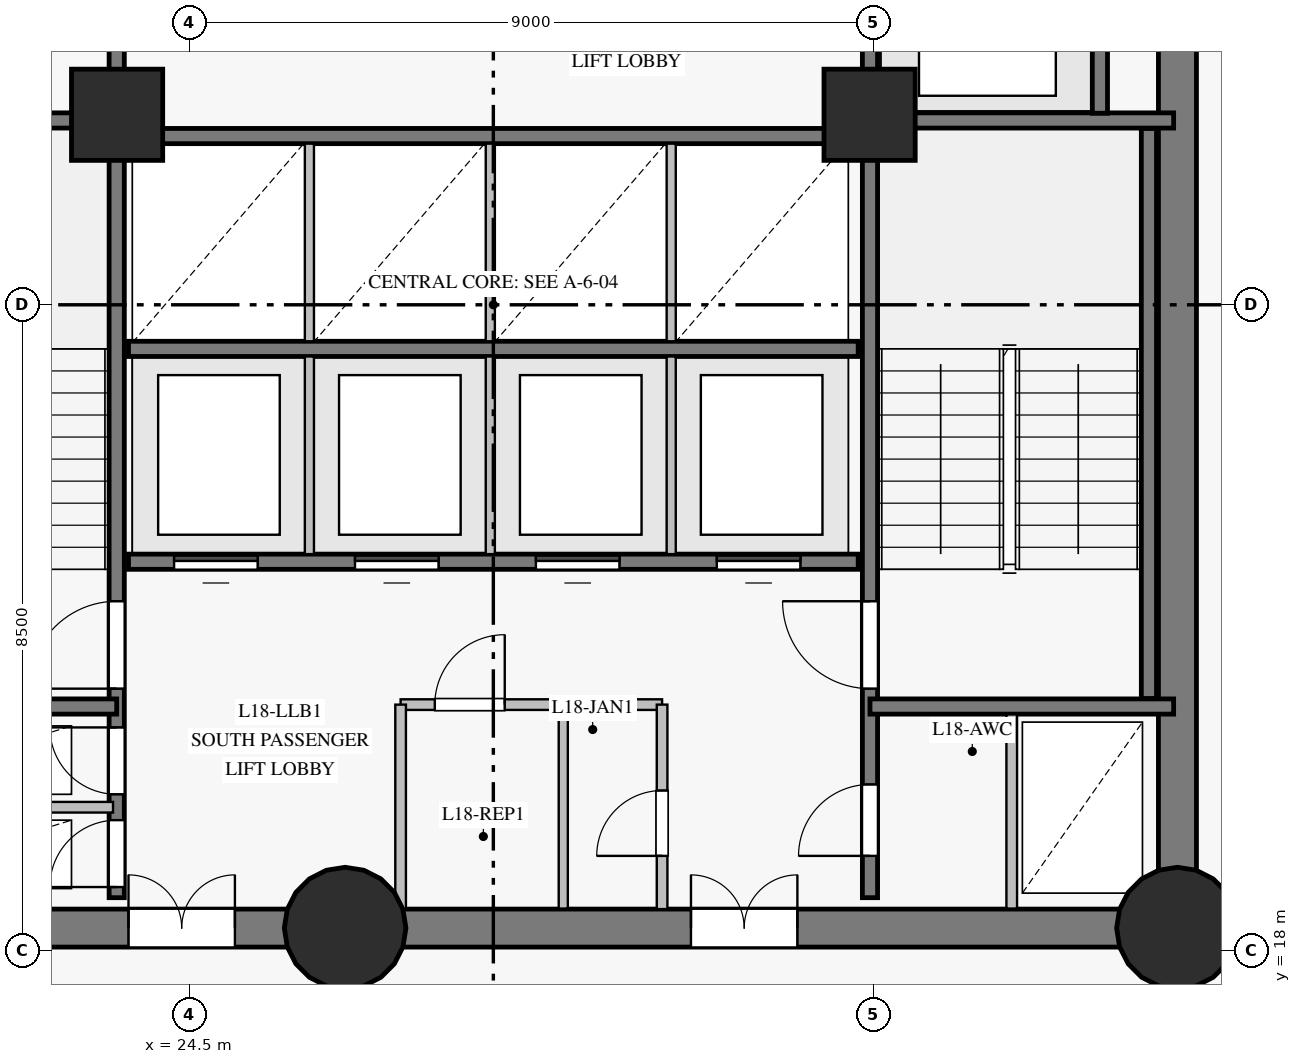
"""IFC4 building model, lengths in metres.
Left out: names, types, materials, properties, quantities, classifications, styles, units other than length and angle.
Written with IfcOpenShell. Run it as: python <this file> out.ifc"""

import sys

from ifc_helpers import new_model, si_unit, direction, frame, frame_2d, origin, origin_with_axes, origin_2d, place, context, subcontext, project, spatial, rectangle, circle, extrude, source, transform, mapped, element, fill, save


model = new_model("IFC4")
c1 = context("Model", 3, precision=1e-05, world=origin(), true_north=direction((0.0, 1.0)))
c2 = subcontext(c1, "Body", "Model", "MODEL_VIEW")
j1 = project(units=[si_unit("LENGTHUNIT", "METRE"), si_unit("PLANEANGLEUNIT", "RADIAN")], contexts=[c1])
p1 = place(None, origin())
s1 = spatial("IfcSite", under=j1, at=p1, CompositionType="ELEMENT")
p2 = place(p1, origin())
s2 = spatial("IfcBuilding", under=s1, at=p2, CompositionType="ELEMENT")
p3 = place(p2, frame((0.0, 0.0, 69.7)))
s3 = spatial("IfcBuildingStorey", under=s2, at=p3, CompositionType="ELEMENT", Elevation=69.7)
p4 = place(p3, frame((19.5, 18.3, 0.0), z_axis=(0.0, 0.0, 1.0), x_axis=(1.0, 0.0, 0.0)))
e1 = element("IfcWall", 1, at=p4, inside=s3, PredefinedType="SHEAR", context=c2, shape_type="SweptSolid", body=[
    extrude(rectangle(XDim=7.05, YDim=0.5, at=frame_2d((3.525, 0.0))), origin(), (0.0, 0.0, 1.0), 3.35),
])
p5 = place(p4, frame((4.2, 0.0, 0.0)))
e2 = element("IfcOpeningElement", 2, at=p5, cuts=e1, PredefinedType="OPENING", context=c2, shape_type="SweptSolid", body=[
    extrude(rectangle(XDim=1.4, YDim=2.2, at=frame_2d((0.7, 1.1))), frame((0.0, 0.26, 0.0), z_axis=(0.0, -1.0, 0.0), x_axis=(1.0, 0.0, 0.0)), (0.0, 0.0, 1.0), 0.52),
])
p6 = place(p3, frame((26.55, 18.3, 0.0), z_axis=(0.0, 0.0, 1.0), x_axis=(1.0, 0.0, 0.0)))
e3 = element("IfcWall", 3, at=p6, inside=s3, PredefinedType="SHEAR", context=c2, shape_type="SweptSolid", body=[
    extrude(rectangle(XDim=10.95, YDim=0.5, at=frame_2d((5.475, 0.0))), origin(), (0.0, 0.0, 1.0), 3.35),
])
p7 = place(p6, frame((4.55, 0.0, 0.0)))
e4 = element("IfcOpeningElement", 4, at=p7, cuts=e3, PredefinedType="OPENING", context=c2, shape_type="SweptSolid", body=[
    extrude(rectangle(XDim=1.4, YDim=2.2, at=frame_2d((0.7, 1.1))), frame((0.0, 0.26, 0.0), z_axis=(0.0, -1.0, 0.0), x_axis=(1.0, 0.0, 0.0)), (0.0, 0.0, 1.0), 0.52),
])
p8 = place(p3, frame((37.5, 18.3, 0.0), z_axis=(0.0, 0.0, 1.0), x_axis=(0.0, 1.0, 0.0)))
e5 = element("IfcWall", 5, at=p8, inside=s3, PredefinedType="SHEAR", context=c2, shape_type="SweptSolid", body=[
    extrude(rectangle(XDim=16.4, YDim=0.5, at=frame_2d((8.2, 0.0))), origin(), (0.0, 0.0, 1.0), 3.35),
])
p9 = place(p8, frame((14.06, 0.0, 0.0)))
e6 = element("IfcOpeningElement", 6, at=p9, cuts=e5, PredefinedType="OPENING", context=c2, shape_type="SweptSolid", body=[
    extrude(rectangle(XDim=1.2, YDim=2.15, at=frame_2d((0.6, 1.075))), frame((0.0, 0.26, 0.0), z_axis=(0.0, -1.0, 0.0), x_axis=(1.0, 0.0, 0.0)), (0.0, 0.0, 1.0), 0.52),
])
m1 = source(origin_with_axes(), c2, "Body", "SweptSolid", [
    extrude(circle(Radius=0.8, at=origin_2d()), origin(), (0.0, 0.0, 1.0), 3.6),
])
for number, where, z_axis, x_axis in (
    (7, (26.55, 18.3, 0.0), (0.0, 0.0, 1.0), (1.0, 0.0, 0.0)),
    (8, (37.5, 18.3, 0.0), (0.0, 0.0, 1.0), (1.0, 0.0, 0.0)),
):
    element("IfcColumn", number, at=place(p3, frame(where, z_axis=z_axis, x_axis=x_axis)), inside=s3, PredefinedType="COLUMN", context=c2, shape_type="MappedRepresentation", body=[
        mapped(m1, transform((0.0, 0.0, 0.0), scale=1.0)),
    ])
m2 = source(origin_with_axes(), c2, "Body", "SweptSolid", [
    extrude(rectangle(XDim=1.2, YDim=1.2, at=origin_2d()), origin(), (0.0, 0.0, 1.0), 3.6),
])
for number, where, z_axis, x_axis in (
    (9, (23.55, 29.0, 0.0), (0.0, 0.0, 1.0), (1.0, 0.0, 0.0)),
    (10, (33.45, 29.0, 0.0), (0.0, 0.0, 1.0), (1.0, 0.0, 0.0)),
):
    element("IfcColumn", number, at=place(p3, frame(where, z_axis=z_axis, x_axis=x_axis)), inside=s3, PredefinedType="COLUMN", context=c2, shape_type="MappedRepresentation", body=[
        mapped(m2, transform((0.0, 0.0, 0.0), scale=1.0)),
    ])
p10 = place(p3, frame((23.545, 18.7, 0.0), z_axis=(0.0, 0.0, 1.0), x_axis=(0.0, 1.0, 0.0)))
e11 = element("IfcWall", 11, at=p10, inside=s3, PredefinedType="SHEAR", context=c2, shape_type="SweptSolid", body=[
    extrude(rectangle(XDim=15.6, YDim=0.2, at=frame_2d((7.8, 0.0))), origin(), (0.0, 0.0, 1.0), 3.35),
])
p11 = place(p10, frame((2.75, 0.0, 0.0)))
e12 = element("IfcOpeningElement", 12, at=p11, cuts=e11, PredefinedType="OPENING", context=c2, shape_type="SweptSolid", body=[
    extrude(rectangle(XDim=1.15, YDim=2.15, at=frame_2d((0.575, 1.075))), frame((0.0, 0.11, 0.0), z_axis=(0.0, -1.0, 0.0), x_axis=(1.0, 0.0, 0.0)), (0.0, 0.0, 1.0), 0.22),
])
p12 = place(p10, frame((0.14, 0.0, 0.0)))
e13 = element("IfcOpeningElement", 13, at=p12, cuts=e11, PredefinedType="OPENING", context=c2, shape_type="SweptSolid", body=[
    extrude(rectangle(XDim=0.88, YDim=2.1, at=frame_2d((0.44, 1.05))), frame((0.0, 0.11, 0.0), z_axis=(0.0, -1.0, 0.0), x_axis=(1.0, 0.0, 0.0)), (0.0, 0.0, 1.0), 0.22),
])
p13 = place(p10, frame((1.36, 0.0, 0.0)))
e14 = element("IfcOpeningElement", 14, at=p13, cuts=e11, PredefinedType="OPENING", context=c2, shape_type="SweptSolid", body=[
    extrude(rectangle(XDim=0.88, YDim=2.1, at=frame_2d((0.44, 1.05))), frame((0.0, 0.11, 0.0), z_axis=(0.0, -1.0, 0.0), x_axis=(1.0, 0.0, 0.0)), (0.0, 0.0, 1.0), 0.22),
])
p14 = place(p10, frame((12.1, 0.0, 0.0)))
e15 = element("IfcOpeningElement", 15, at=p14, cuts=e11, PredefinedType="OPENING", context=c2, shape_type="SweptSolid", body=[
    extrude(rectangle(XDim=1.12, YDim=2.15, at=frame_2d((0.56, 1.075))), frame((0.0, 0.11, 0.0), z_axis=(0.0, -1.0, 0.0), x_axis=(1.0, 0.0, 0.0)), (0.0, 0.0, 1.0), 0.22),
])
p15 = place(p10, frame((14.05, 0.0, 0.0)))
e16 = element("IfcOpeningElement", 16, at=p15, cuts=e11, PredefinedType="OPENING", context=c2, shape_type="SweptSolid", body=[
    extrude(rectangle(XDim=1.12, YDim=2.15, at=frame_2d((0.56, 1.075))), frame((0.0, 0.11, 0.0), z_axis=(0.0, -1.0, 0.0), x_axis=(1.0, 0.0, 0.0)), (0.0, 0.0, 1.0), 0.22),
])
p16 = place(p3, frame((33.455, 18.7, 0.0), z_axis=(0.0, 0.0, 1.0), x_axis=(0.0, 1.0, 0.0)))
e17 = element("IfcWall", 17, at=p16, inside=s3, PredefinedType="SHEAR", context=c2, shape_type="SweptSolid", body=[
    extrude(rectangle(XDim=15.6, YDim=0.2, at=frame_2d((7.8, 0.0))), origin(), (0.0, 0.0, 1.0), 3.35),
])
p17 = place(p16, frame((2.75, 0.0, 0.0)))
e18 = element("IfcOpeningElement", 18, at=p17, cuts=e17, PredefinedType="OPENING", context=c2, shape_type="SweptSolid", body=[
    extrude(rectangle(XDim=1.15, YDim=2.15, at=frame_2d((0.575, 1.075))), frame((0.0, 0.11, 0.0), z_axis=(0.0, -1.0, 0.0), x_axis=(1.0, 0.0, 0.0)), (0.0, 0.0, 1.0), 0.22),
])
p18 = place(p16, frame((0.55, 0.0, 0.0)))
e19 = element("IfcOpeningElement", 19, at=p18, cuts=e17, PredefinedType="OPENING", context=c2, shape_type="SweptSolid", body=[
    extrude(rectangle(XDim=0.94, YDim=2.1, at=frame_2d((0.47, 1.05))), frame((0.0, 0.11, 0.0), z_axis=(0.0, -1.0, 0.0), x_axis=(1.0, 0.0, 0.0)), (0.0, 0.0, 1.0), 0.22),
])
p19 = place(p3, frame((23.7, 23.12, 0.0), z_axis=(0.0, 0.0, 1.0), x_axis=(1.0, 0.0, 0.0)))
e20 = element("IfcWall", 20, at=p19, inside=s3, PredefinedType="SHEAR", context=c2, shape_type="SweptSolid", body=[
    extrude(rectangle(XDim=9.6, YDim=0.2, at=frame_2d((4.8, 0.0))), origin(), (0.0, 0.0, 1.0), 3.35),
])
p20 = place(p19, frame((0.6, 0.0, 0.0)))
e21 = element("IfcOpeningElement", 21, at=p20, cuts=e20, PredefinedType="OPENING", context=c2, shape_type="SweptSolid", body=[
    extrude(rectangle(XDim=1.1, YDim=2.15, at=frame_2d((0.55, 1.075))), frame((0.0, 0.11, 0.0), z_axis=(0.0, -1.0, 0.0), x_axis=(1.0, 0.0, 0.0)), (0.0, 0.0, 1.0), 0.22),
])
p21 = place(p19, frame((2.98, 0.0, 0.0)))
e22 = element("IfcOpeningElement", 22, at=p21, cuts=e20, PredefinedType="OPENING", context=c2, shape_type="SweptSolid", body=[
    extrude(rectangle(XDim=1.1, YDim=2.15, at=frame_2d((0.55, 1.075))), frame((0.0, 0.11, 0.0), z_axis=(0.0, -1.0, 0.0), x_axis=(1.0, 0.0, 0.0)), (0.0, 0.0, 1.0), 0.22),
])
p22 = place(p19, frame((5.36, 0.0, 0.0)))
e23 = element("IfcOpeningElement", 23, at=p22, cuts=e20, PredefinedType="OPENING", context=c2, shape_type="SweptSolid", body=[
    extrude(rectangle(XDim=1.1, YDim=2.15, at=frame_2d((0.55, 1.075))), frame((0.0, 0.11, 0.0), z_axis=(0.0, -1.0, 0.0), x_axis=(1.0, 0.0, 0.0)), (0.0, 0.0, 1.0), 0.22),
])
p23 = place(p19, frame((7.74, 0.0, 0.0)))
e24 = element("IfcOpeningElement", 24, at=p23, cuts=e20, PredefinedType="OPENING", context=c2, shape_type="SweptSolid", body=[
    extrude(rectangle(XDim=1.1, YDim=2.15, at=frame_2d((0.55, 1.075))), frame((0.0, 0.11, 0.0), z_axis=(0.0, -1.0, 0.0), x_axis=(1.0, 0.0, 0.0)), (0.0, 0.0, 1.0), 0.22),
])
for number, where, z_axis, x_axis in (
    (25, (23.7, 25.92, 0.0), (0.0, 0.0, 1.0), (1.0, 0.0, 0.0)),
    (26, (23.7, 28.72, 0.0), (0.0, 0.0, 1.0), (1.0, 0.0, 0.0)),
):
    element("IfcWall", number, at=place(p3, frame(where, z_axis=z_axis, x_axis=x_axis)), inside=s3, PredefinedType="SHEAR", context=c2, shape_type="SweptSolid", body=[
        extrude(rectangle(XDim=9.6, YDim=0.2, at=frame_2d((4.8, 0.0))), origin(), (0.0, 0.0, 1.0), 3.35),
    ])
p24 = place(p3, frame((37.125, 21.32, 0.0), z_axis=(0.0, 0.0, 1.0), x_axis=(0.0, 1.0, 0.0)))
e27 = element("IfcWall", 27, at=p24, inside=s3, PredefinedType="SHEAR", context=c2, shape_type="SweptSolid", body=[
    extrude(rectangle(XDim=7.5, YDim=0.2, at=frame_2d((3.75, 0.0))), origin(), (0.0, 0.0, 1.0), 3.35),
])
for number, where, z_axis, x_axis in (
    (28, (33.455, 21.215, 0.0), (0.0, 0.0, 1.0), (1.0, 0.0, 0.0)),
    (29, (33.455, 28.925, 0.0), (0.0, 0.0, 1.0), (1.0, 0.0, 0.0)),
    (30, (19.55, 21.215, 0.0), (0.0, 0.0, 1.0), (1.0, 0.0, 0.0)),
    (31, (19.55, 28.925, 0.0), (0.0, 0.0, 1.0), (1.0, 0.0, 0.0)),
):
    element("IfcWall", number, at=place(p3, frame(where, z_axis=z_axis, x_axis=x_axis)), inside=s3, PredefinedType="SHEAR", context=c2, shape_type="SweptSolid", body=[
        extrude(rectangle(XDim=3.995, YDim=0.2, at=frame_2d((1.998, 0.0))), origin(), (0.0, 0.0, 1.0), 3.35),
    ])
p25 = place(p3, frame((36.48, 29.02, 0.0), z_axis=(0.0, 0.0, 1.0), x_axis=(0.0, 1.0, 0.0)))
e32 = element("IfcWall", 32, at=p25, inside=s3, PredefinedType="SHEAR", context=c2, shape_type="SweptSolid", body=[
    extrude(rectangle(XDim=2.86, YDim=0.2, at=frame_2d((1.43, 0.0))), origin(), (0.0, 0.0, 1.0), 3.35),
])
p26 = place(p3, frame((19.757, 19.89, 0.0), z_axis=(0.0, 0.0, 1.0), x_axis=(1.0, 0.0, 0.0)))
e33 = element("IfcWall", 33, at=p26, inside=s3, PredefinedType="PARTITIONING", context=c2, shape_type="SweptSolid", body=[
    extrude(rectangle(XDim=3.739, YDim=0.14, at=frame_2d((1.87, 0.0))), origin(), (0.0, 0.0, 1.0), 3.35),
])
p27 = place(p3, frame((27.28, 21.24, 0.0), z_axis=(0.0, 0.0, 1.0), x_axis=(1.0, 0.0, 0.0)))
e34 = element("IfcWall", 34, at=p27, inside=s3, PredefinedType="PARTITIONING", context=c2, shape_type="SweptSolid", body=[
    extrude(rectangle(XDim=3.44, YDim=0.14, at=frame_2d((1.72, 0.0))), origin(), (0.0, 0.0, 1.0), 3.35),
])
p28 = place(p27, frame((0.45, 0.0, 0.0)))
e35 = element("IfcOpeningElement", 35, at=p28, cuts=e34, PredefinedType="OPENING", context=c2, shape_type="SweptSolid", body=[
    extrude(rectangle(XDim=0.92, YDim=2.1, at=frame_2d((0.46, 1.05))), frame((0.0, 0.08, 0.0), z_axis=(0.0, -1.0, 0.0), x_axis=(1.0, 0.0, 0.0)), (0.0, 0.0, 1.0), 0.16),
])
p29 = place(p3, frame((27.28, 18.55, 0.0), z_axis=(0.0, 0.0, 1.0), x_axis=(0.0, 1.0, 0.0)))
e36 = element("IfcWall", 36, at=p29, inside=s3, PredefinedType="PARTITIONING", context=c2, shape_type="SweptSolid", body=[
    extrude(rectangle(XDim=2.69, YDim=0.14, at=frame_2d((1.345, 0.0))), origin(), (0.0, 0.0, 1.0), 3.35),
])
p30 = place(p3, frame((30.72, 18.55, 0.0), z_axis=(0.0, 0.0, 1.0), x_axis=(0.0, 1.0, 0.0)))
e37 = element("IfcWall", 37, at=p30, inside=s3, PredefinedType="PARTITIONING", context=c2, shape_type="SweptSolid", body=[
    extrude(rectangle(XDim=2.69, YDim=0.14, at=frame_2d((1.345, 0.0))), origin(), (0.0, 0.0, 1.0), 3.35),
])
p31 = place(p30, frame((0.7, 0.0, 0.0)))
e38 = element("IfcOpeningElement", 38, at=p31, cuts=e37, PredefinedType="OPENING", context=c2, shape_type="SweptSolid", body=[
    extrude(rectangle(XDim=0.86, YDim=2.1, at=frame_2d((0.43, 1.05))), frame((0.0, 0.08, 0.0), z_axis=(0.0, -1.0, 0.0), x_axis=(1.0, 0.0, 0.0)), (0.0, 0.0, 1.0), 0.16),
])
for number, where, z_axis, x_axis in (
    (39, (26.08, 23.22, 0.0), (0.0, 0.0, 1.0), (0.0, 1.0, 0.0)),
    (40, (28.46, 23.22, 0.0), (0.0, 0.0, 1.0), (0.0, 1.0, 0.0)),
    (41, (30.84, 23.22, 0.0), (0.0, 0.0, 1.0), (0.0, 1.0, 0.0)),
    (42, (26.08, 26.02, 0.0), (0.0, 0.0, 1.0), (0.0, 1.0, 0.0)),
    (43, (28.46, 26.02, 0.0), (0.0, 0.0, 1.0), (0.0, 1.0, 0.0)),
    (44, (30.84, 26.02, 0.0), (0.0, 0.0, 1.0), (0.0, 1.0, 0.0)),
):
    element("IfcWall", number, at=place(p3, frame(where, z_axis=z_axis, x_axis=x_axis)), inside=s3, PredefinedType="PARTITIONING", context=c2, shape_type="SweptSolid", body=[
        extrude(rectangle(XDim=2.6, YDim=0.12, at=frame_2d((1.3, 0.0))), origin(), (0.0, 0.0, 1.0), 3.35),
    ])
p32 = place(p3, frame((29.42, 18.557, 0.0), z_axis=(0.0, 0.0, 1.0), x_axis=(0.0, 1.0, 0.0)))
e45 = element("IfcWall", 45, at=p32, inside=s3, PredefinedType="PARTITIONING", context=c2, shape_type="SweptSolid", body=[
    extrude(rectangle(XDim=2.611, YDim=0.12, at=frame_2d((1.306, 0.0))), origin(), (0.0, 0.0, 1.0), 3.35),
])
p33 = place(p3, frame((35.32, 18.557, 0.0), z_axis=(0.0, 0.0, 1.0), x_axis=(0.0, 1.0, 0.0)))
e46 = element("IfcWall", 46, at=p33, inside=s3, PredefinedType="PARTITIONING", context=c2, shape_type="SweptSolid", body=[
    extrude(rectangle(XDim=2.553, YDim=0.14, at=frame_2d((1.277, 0.0))), origin(), (0.0, 0.0, 1.0), 3.35),
])
m3 = source(origin_with_axes(), c2, "Body", "SweptSolid", [
    extrude(rectangle(XDim=1.15, YDim=2.15, at=frame_2d((0.575, 1.075))), frame((0.0, 0.025, 0.0), z_axis=(0.0, -1.0, 0.0), x_axis=(1.0, 0.0, 0.0)), (0.0, 0.0, 1.0), 0.05),
])
p34 = place(p11, origin())
e47 = element("IfcDoor", 47, at=p34, inside=s3, OperationType="SINGLE_SWING_LEFT", PredefinedType="DOOR", context=c2, shape_type="MappedRepresentation", body=[
    mapped(m3, transform((0.0, 0.0, 0.0), scale=1.0)),
])
fill(e12, e47)
p35 = place(p17, origin())
e48 = element("IfcDoor", 48, at=p35, inside=s3, OperationType="SINGLE_SWING_RIGHT", PredefinedType="DOOR", context=c2, shape_type="MappedRepresentation", body=[
    mapped(m3, transform((0.0, 0.0, 0.0), scale=1.0)),
])
fill(e18, e48)
m4 = source(origin_with_axes(), c2, "Body", "SweptSolid", [
    extrude(rectangle(XDim=0.88, YDim=2.1, at=frame_2d((0.44, 1.05))), frame((0.0, 0.025, 0.0), z_axis=(0.0, -1.0, 0.0), x_axis=(1.0, 0.0, 0.0)), (0.0, 0.0, 1.0), 0.05),
])
p36 = place(p12, origin())
e49 = element("IfcDoor", 49, at=p36, inside=s3, OperationType="SINGLE_SWING_LEFT", PredefinedType="DOOR", context=c2, shape_type="MappedRepresentation", body=[
    mapped(m4, transform((0.0, 0.0, 0.0), scale=1.0)),
])
fill(e13, e49)
p37 = place(p13, origin())
e50 = element("IfcDoor", 50, at=p37, inside=s3, OperationType="SINGLE_SWING_RIGHT", PredefinedType="DOOR", context=c2, shape_type="MappedRepresentation", body=[
    mapped(m4, transform((0.0, 0.0, 0.0), scale=1.0)),
])
fill(e14, e50)
m5 = source(origin_with_axes(), c2, "Body", "SweptSolid", [
    extrude(rectangle(XDim=1.4, YDim=2.2, at=frame_2d((0.7, 1.1))), frame((0.0, 0.025, 0.0), z_axis=(0.0, -1.0, 0.0), x_axis=(1.0, 0.0, 0.0)), (0.0, 0.0, 1.0), 0.05),
])
p38 = place(p5, origin())
e51 = element("IfcDoor", 51, at=p38, inside=s3, OperationType="DOUBLE_DOOR_SINGLE_SWING", PredefinedType="DOOR", context=c2, shape_type="MappedRepresentation", body=[
    mapped(m5, transform((0.0, 0.0, 0.0), scale=1.0)),
])
fill(e2, e51)
p39 = place(p7, origin())
e52 = element("IfcDoor", 52, at=p39, inside=s3, OperationType="DOUBLE_DOOR_SINGLE_SWING", PredefinedType="DOOR", context=c2, shape_type="MappedRepresentation", body=[
    mapped(m5, transform((0.0, 0.0, 0.0), scale=1.0)),
])
fill(e4, e52)
m6 = source(origin_with_axes(), c2, "Body", "SweptSolid", [
    extrude(rectangle(XDim=0.94, YDim=2.1, at=frame_2d((0.47, 1.05))), frame((0.0, 0.025, 0.0), z_axis=(0.0, -1.0, 0.0), x_axis=(1.0, 0.0, 0.0)), (0.0, 0.0, 1.0), 0.05),
])
p40 = place(p18, origin())
e53 = element("IfcDoor", 53, at=p40, inside=s3, OperationType="SINGLE_SWING_LEFT", PredefinedType="DOOR", context=c2, shape_type="MappedRepresentation", body=[
    mapped(m6, transform((0.0, 0.0, 0.0), scale=1.0)),
])
fill(e19, e53)
m7 = source(origin_with_axes(), c2, "Body", "SweptSolid", [
    extrude(rectangle(XDim=0.92, YDim=2.1, at=frame_2d((0.46, 1.05))), frame((0.0, 0.025, 0.0), z_axis=(0.0, -1.0, 0.0), x_axis=(1.0, 0.0, 0.0)), (0.0, 0.0, 1.0), 0.05),
])
p41 = place(p28, origin())
e54 = element("IfcDoor", 54, at=p41, inside=s3, OperationType="SINGLE_SWING_RIGHT", PredefinedType="DOOR", context=c2, shape_type="MappedRepresentation", body=[
    mapped(m7, transform((0.0, 0.0, 0.0), scale=1.0)),
])
fill(e35, e54)
m8 = source(origin_with_axes(), c2, "Body", "SweptSolid", [
    extrude(rectangle(XDim=0.86, YDim=2.1, at=frame_2d((0.43, 1.05))), frame((0.0, 0.025, 0.0), z_axis=(0.0, -1.0, 0.0), x_axis=(1.0, 0.0, 0.0)), (0.0, 0.0, 1.0), 0.05),
])
p42 = place(p31, origin())
e55 = element("IfcDoor", 55, at=p42, inside=s3, OperationType="SINGLE_SWING_LEFT", PredefinedType="DOOR", context=c2, shape_type="MappedRepresentation", body=[
    mapped(m8, transform((0.0, 0.0, 0.0), scale=1.0)),
])
fill(e38, e55)
m9 = source(origin_with_axes(), c2, "Body", "SweptSolid", [
    extrude(rectangle(XDim=1.1, YDim=2.15, at=frame_2d((0.55, 1.075))), frame((0.0, 0.025, 0.0), z_axis=(0.0, -1.0, 0.0), x_axis=(1.0, 0.0, 0.0)), (0.0, 0.0, 1.0), 0.05),
])
p43 = place(p20, origin())
e56 = element("IfcDoor", 56, at=p43, inside=s3, OperationType="SLIDING_TO_LEFT", PredefinedType="DOOR", context=c2, shape_type="MappedRepresentation", body=[
    mapped(m9, transform((0.0, 0.0, 0.0), scale=1.0)),
])
fill(e21, e56)
p44 = place(p21, origin())
e57 = element("IfcDoor", 57, at=p44, inside=s3, OperationType="SLIDING_TO_RIGHT", PredefinedType="DOOR", context=c2, shape_type="MappedRepresentation", body=[
    mapped(m9, transform((0.0, 0.0, 0.0), scale=1.0)),
])
fill(e22, e57)
p45 = place(p22, origin())
e58 = element("IfcDoor", 58, at=p45, inside=s3, OperationType="SLIDING_TO_LEFT", PredefinedType="DOOR", context=c2, shape_type="MappedRepresentation", body=[
    mapped(m9, transform((0.0, 0.0, 0.0), scale=1.0)),
])
fill(e23, e58)
p46 = place(p23, origin())
e59 = element("IfcDoor", 59, at=p46, inside=s3, OperationType="SLIDING_TO_RIGHT", PredefinedType="DOOR", context=c2, shape_type="MappedRepresentation", body=[
    mapped(m9, transform((0.0, 0.0, 0.0), scale=1.0)),
])
fill(e24, e59)
save(model, sys.argv[1])
